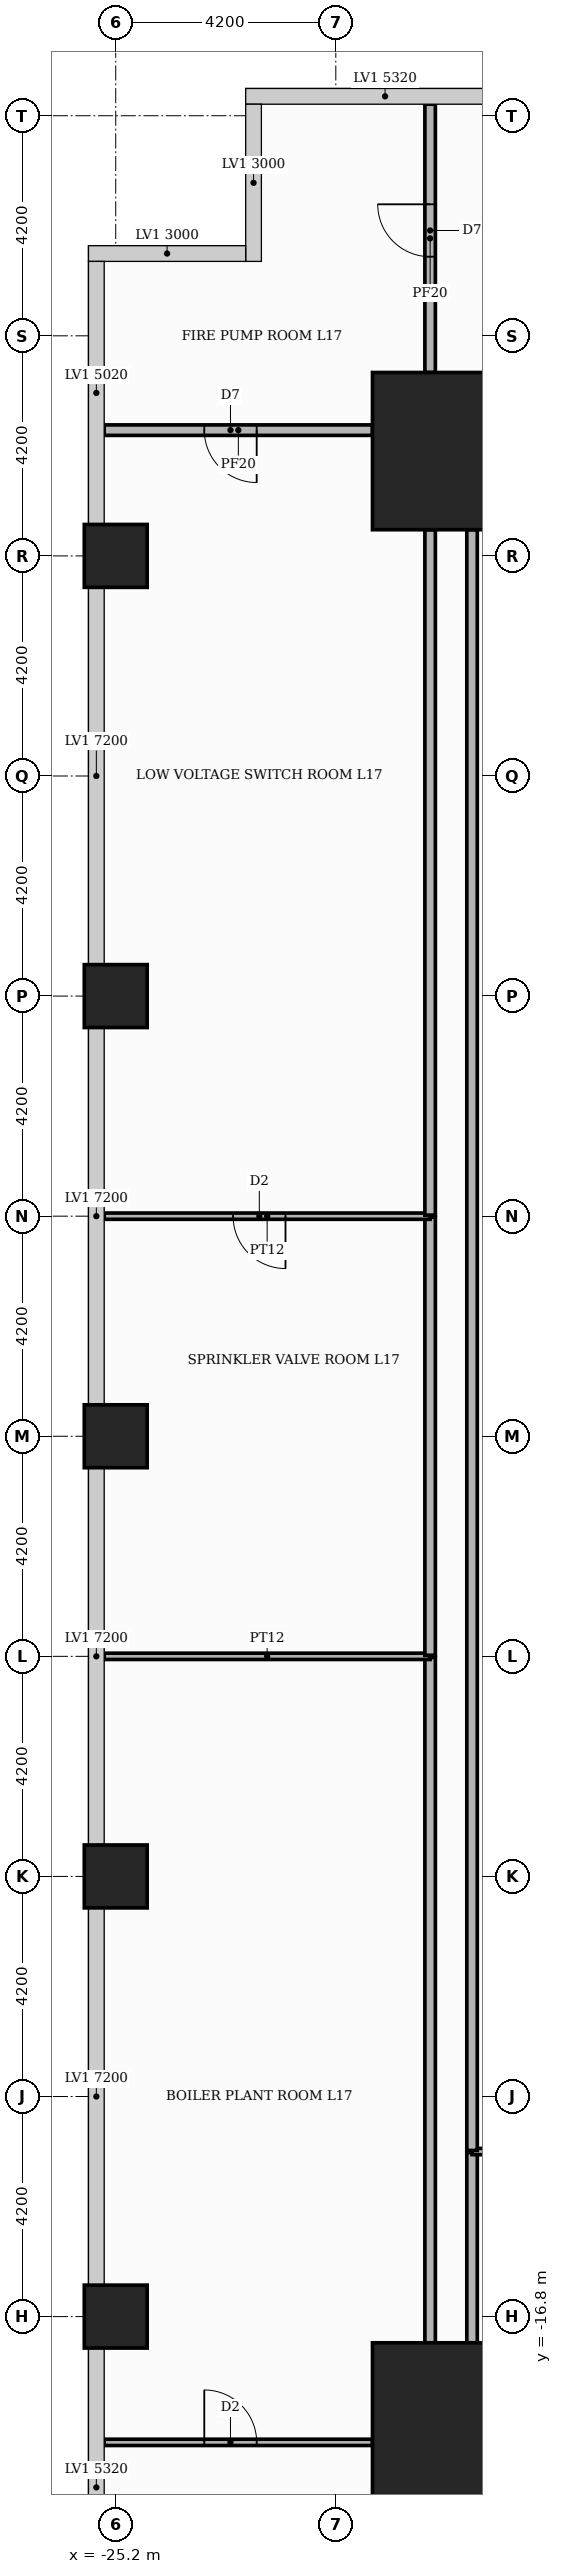
"""IFC4 building model, lengths in metres.
Left out: names, types, materials, properties, quantities, classifications, styles, units other than length and angle.
Written with IfcOpenShell. Run it as: python <this file> out.ifc"""

import sys

from ifc_helpers import new_model, si_unit, direction, frame, frame_2d, origin, origin_2d, place, context, subcontext, project, spatial, rectangle, extrude, element, fill, save


model = new_model("IFC4")
c1 = context("Model", 3, precision=1e-05, world=origin(), true_north=direction((0.0, 1.0)))
c2 = subcontext(c1, "Body", "Model", "MODEL_VIEW")
j1 = project(units=[si_unit("LENGTHUNIT", "METRE"), si_unit("PLANEANGLEUNIT", "RADIAN")], contexts=[c1])
p1 = place(None, origin())
s1 = spatial("IfcSite", under=j1, at=p1, CompositionType="ELEMENT")
p2 = place(p1, origin())
s2 = spatial("IfcBuilding", under=s1, at=p2, CompositionType="ELEMENT")
p3 = place(p2, frame((0.0, 0.0, 73.8)))
s3 = spatial("IfcBuildingStorey", under=s2, at=p3, CompositionType="ELEMENT", Elevation=73.8)
for number, where, z_axis, x_axis in (
    (1, (-18.8, 18.8, 0.0), (0.0, 0.0, 1.0), (1.0, 0.0, 0.0)),
    (2, (-18.8, -18.8, 0.0), (0.0, 0.0, 1.0), (1.0, 0.0, 0.0)),
):
    element("IfcColumn", number, at=place(p3, frame(where, z_axis=z_axis, x_axis=x_axis)), inside=s3, PredefinedType="COLUMN", context=c2, shape_type="SweptSolid", body=[
        extrude(rectangle(XDim=3.0, YDim=3.0, at=origin_2d()), origin(), (0.0, 0.0, 1.0), 5.4),
    ])
for number, where, z_axis, x_axis in (
    (3, (-25.2, 0.0, 0.0), (0.0, 0.0, 1.0), (1.0, 0.0, 0.0)),
    (4, (-25.2, -8.4, 0.0), (0.0, 0.0, 1.0), (1.0, 0.0, 0.0)),
    (5, (-25.2, -16.8, 0.0), (0.0, 0.0, 1.0), (1.0, 0.0, 0.0)),
    (6, (-25.2, 8.4, 0.0), (0.0, 0.0, 1.0), (1.0, 0.0, 0.0)),
    (7, (-25.2, 16.8, 0.0), (0.0, 0.0, 1.0), (1.0, 0.0, 0.0)),
):
    element("IfcColumn", number, at=place(p3, frame(where, z_axis=z_axis, x_axis=x_axis)), inside=s3, PredefinedType="COLUMN", context=c2, shape_type="SweptSolid", body=[
        extrude(rectangle(XDim=1.2, YDim=1.2, at=origin_2d()), origin(), (0.0, 0.0, 1.0), 5.4),
    ])
p4 = place(p3, frame((-25.42, -19.2, 0.0), z_axis=(0.0, 0.0, 1.0), x_axis=(1.0, 0.0, 0.0)))
e8 = element("IfcWall", 8, at=p4, inside=s3, PredefinedType="PARTITIONING", context=c2, shape_type="SweptSolid", body=[
    extrude(rectangle(XDim=5.12, YDim=0.12, at=frame_2d((2.56, 0.0))), origin(), (0.0, 0.0, 1.0), 4.98),
])
p5 = place(p4, frame((1.91, 0.0, 0.0)))
e9 = element("IfcOpeningElement", 9, at=p5, cuts=e8, PredefinedType="OPENING", context=c2, shape_type="SweptSolid", body=[
    extrude(rectangle(XDim=1.0, YDim=2.1, at=frame_2d((0.5, 1.05))), frame((0.0, 0.07, 0.0), z_axis=(0.0, -1.0, 0.0), x_axis=(1.0, 0.0, 0.0)), (0.0, 0.0, 1.0), 0.14),
])
p6 = place(p3, frame((-19.2, -17.3, 0.0), z_axis=(0.0, 0.0, 1.0), x_axis=(0.0, 1.0, 0.0)))
e10 = element("IfcWall", 10, at=p6, inside=s3, PredefinedType="PARTITIONING", context=c2, shape_type="SweptSolid", body=[
    extrude(rectangle(XDim=13.08, YDim=0.2, at=frame_2d((6.54, 0.0))), origin(), (0.0, 0.0, 1.0), 4.98),
])
p7 = place(p3, frame((-18.4, -17.3, 0.0), z_axis=(0.0, 0.0, 1.0), x_axis=(0.0, 1.0, 0.0)))
e11 = element("IfcWall", 11, at=p7, inside=s3, PredefinedType="PARTITIONING", context=c2, shape_type="SweptSolid", body=[
    extrude(rectangle(XDim=3.63, YDim=0.2, at=frame_2d((1.815, 0.0))), origin(), (0.0, 0.0, 1.0), 4.98),
])
p8 = place(p3, frame((-18.4, -13.65, 0.0), z_axis=(0.0, 0.0, 1.0), x_axis=(1.0, 0.0, 0.0)))
e12 = element("IfcWall", 12, at=p8, inside=s3, PredefinedType="PARTITIONING", context=c2, shape_type="SweptSolid", body=[
    extrude(rectangle(XDim=4.75, YDim=0.12, at=frame_2d((2.375, 0.0))), origin(), (0.0, 0.0, 1.0), 4.98),
])
p9 = place(p3, frame((-18.4, -13.63, 0.0), z_axis=(0.0, 0.0, 1.0), x_axis=(0.0, 1.0, 0.0)))
e13 = element("IfcWall", 13, at=p9, inside=s3, PredefinedType="PARTITIONING", context=c2, shape_type="SweptSolid", body=[
    extrude(rectangle(XDim=30.93, YDim=0.2, at=frame_2d((15.465, 0.0))), origin(), (0.0, 0.0, 1.0), 4.98),
])
p10 = place(p3, frame((-25.42, -4.2, 0.0), z_axis=(0.0, 0.0, 1.0), x_axis=(1.0, 0.0, 0.0)))
e14 = element("IfcWall", 14, at=p10, inside=s3, PredefinedType="PARTITIONING", context=c2, shape_type="SweptSolid", body=[
    extrude(rectangle(XDim=6.22, YDim=0.12, at=frame_2d((3.11, 0.0))), origin(), (0.0, 0.0, 1.0), 4.98),
])
p11 = place(p3, frame((-19.2, -4.18, 0.0), z_axis=(0.0, 0.0, 1.0), x_axis=(0.0, 1.0, 0.0)))
e15 = element("IfcWall", 15, at=p11, inside=s3, PredefinedType="PARTITIONING", context=c2, shape_type="SweptSolid", body=[
    extrude(rectangle(XDim=8.36, YDim=0.2, at=frame_2d((4.18, 0.0))), origin(), (0.0, 0.0, 1.0), 4.98),
])
p12 = place(p3, frame((-25.42, 4.2, 0.0), z_axis=(0.0, 0.0, 1.0), x_axis=(1.0, 0.0, 0.0)))
e16 = element("IfcWall", 16, at=p12, inside=s3, PredefinedType="PARTITIONING", context=c2, shape_type="SweptSolid", body=[
    extrude(rectangle(XDim=6.22, YDim=0.12, at=frame_2d((3.11, 0.0))), origin(), (0.0, 0.0, 1.0), 4.98),
])
p13 = place(p12, frame((2.46, 0.0, 0.0)))
e17 = element("IfcOpeningElement", 17, at=p13, cuts=e16, PredefinedType="OPENING", context=c2, shape_type="SweptSolid", body=[
    extrude(rectangle(XDim=1.0, YDim=2.1, at=frame_2d((0.5, 1.05))), frame((0.0, 0.07, 0.0), z_axis=(0.0, -1.0, 0.0), x_axis=(1.0, 0.0, 0.0)), (0.0, 0.0, 1.0), 0.14),
])
p14 = place(p3, frame((-19.2, 4.22, 0.0), z_axis=(0.0, 0.0, 1.0), x_axis=(0.0, 1.0, 0.0)))
e18 = element("IfcWall", 18, at=p14, inside=s3, PredefinedType="PARTITIONING", context=c2, shape_type="SweptSolid", body=[
    extrude(rectangle(XDim=13.08, YDim=0.2, at=frame_2d((6.54, 0.0))), origin(), (0.0, 0.0, 1.0), 4.98),
])
p15 = place(p3, frame((-25.42, 19.2, 0.0), z_axis=(0.0, 0.0, 1.0), x_axis=(1.0, 0.0, 0.0)))
e19 = element("IfcWall", 19, at=p15, inside=s3, PredefinedType="PARTITIONING", context=c2, shape_type="SweptSolid", body=[
    extrude(rectangle(XDim=5.12, YDim=0.2, at=frame_2d((2.56, 0.0))), origin(), (0.0, 0.0, 1.0), 4.98),
])
p16 = place(p15, frame((1.91, 0.0, 0.0)))
e20 = element("IfcOpeningElement", 20, at=p16, cuts=e19, PredefinedType="OPENING", context=c2, shape_type="SweptSolid", body=[
    extrude(rectangle(XDim=1.0, YDim=2.1, at=frame_2d((0.5, 1.05))), frame((0.0, 0.11, 0.0), z_axis=(0.0, -1.0, 0.0), x_axis=(1.0, 0.0, 0.0)), (0.0, 0.0, 1.0), 0.22),
])
p17 = place(p3, frame((-19.2, 20.3, 0.0), z_axis=(0.0, 0.0, 1.0), x_axis=(0.0, 1.0, 0.0)))
e21 = element("IfcWall", 21, at=p17, inside=s3, PredefinedType="PARTITIONING", context=c2, shape_type="SweptSolid", body=[
    extrude(rectangle(XDim=5.12, YDim=0.2, at=frame_2d((2.56, 0.0))), origin(), (0.0, 0.0, 1.0), 4.98),
])
p18 = place(p17, frame((2.21, 0.0, 0.0)))
e22 = element("IfcOpeningElement", 22, at=p18, cuts=e21, PredefinedType="OPENING", context=c2, shape_type="SweptSolid", body=[
    extrude(rectangle(XDim=1.0, YDim=2.1, at=frame_2d((0.5, 1.05))), frame((0.0, 0.11, 0.0), z_axis=(0.0, -1.0, 0.0), x_axis=(1.0, 0.0, 0.0)), (0.0, 0.0, 1.0), 0.22),
])
p19 = place(p18, origin())
e23 = element("IfcDoor", 23, at=p19, inside=s3, OperationType="SINGLE_SWING_RIGHT", PredefinedType="DOOR", context=c2, shape_type="SweptSolid", body=[
    extrude(rectangle(XDim=1.0, YDim=2.1, at=frame_2d((0.5, 1.05))), frame((0.0, 0.025, 0.0), z_axis=(0.0, -1.0, 0.0), x_axis=(1.0, 0.0, 0.0)), (0.0, 0.0, 1.0), 0.05),
])
fill(e22, e23)
p20 = place(p16, frame((1.0, 0.0, 0.0), z_axis=(0.0, 0.0, 1.0), x_axis=(-1.0, 0.0, 0.0)))
e24 = element("IfcDoor", 24, at=p20, inside=s3, OperationType="SINGLE_SWING_RIGHT", PredefinedType="DOOR", context=c2, shape_type="SweptSolid", body=[
    extrude(rectangle(XDim=1.0, YDim=2.1, at=frame_2d((0.5, 1.05))), frame((0.0, 0.025, 0.0), z_axis=(0.0, -1.0, 0.0), x_axis=(1.0, 0.0, 0.0)), (0.0, 0.0, 1.0), 0.05),
])
fill(e20, e24)
p21 = place(p13, frame((1.0, 0.0, 0.0), z_axis=(0.0, 0.0, 1.0), x_axis=(-1.0, 0.0, 0.0)))
e25 = element("IfcDoor", 25, at=p21, inside=s3, OperationType="SINGLE_SWING_RIGHT", PredefinedType="DOOR", context=c2, shape_type="SweptSolid", body=[
    extrude(rectangle(XDim=1.0, YDim=2.1, at=frame_2d((0.5, 1.05))), frame((0.0, 0.025, 0.0), z_axis=(0.0, -1.0, 0.0), x_axis=(1.0, 0.0, 0.0)), (0.0, 0.0, 1.0), 0.05),
])
fill(e17, e25)
p22 = place(p5, origin())
e26 = element("IfcDoor", 26, at=p22, inside=s3, OperationType="SINGLE_SWING_LEFT", PredefinedType="DOOR", context=c2, shape_type="SweptSolid", body=[
    extrude(rectangle(XDim=1.0, YDim=2.1, at=frame_2d((0.5, 1.05))), frame((0.0, 0.025, 0.0), z_axis=(0.0, -1.0, 0.0), x_axis=(1.0, 0.0, 0.0)), (0.0, 0.0, 1.0), 0.05),
])
fill(e9, e26)
save(model, sys.argv[1])
